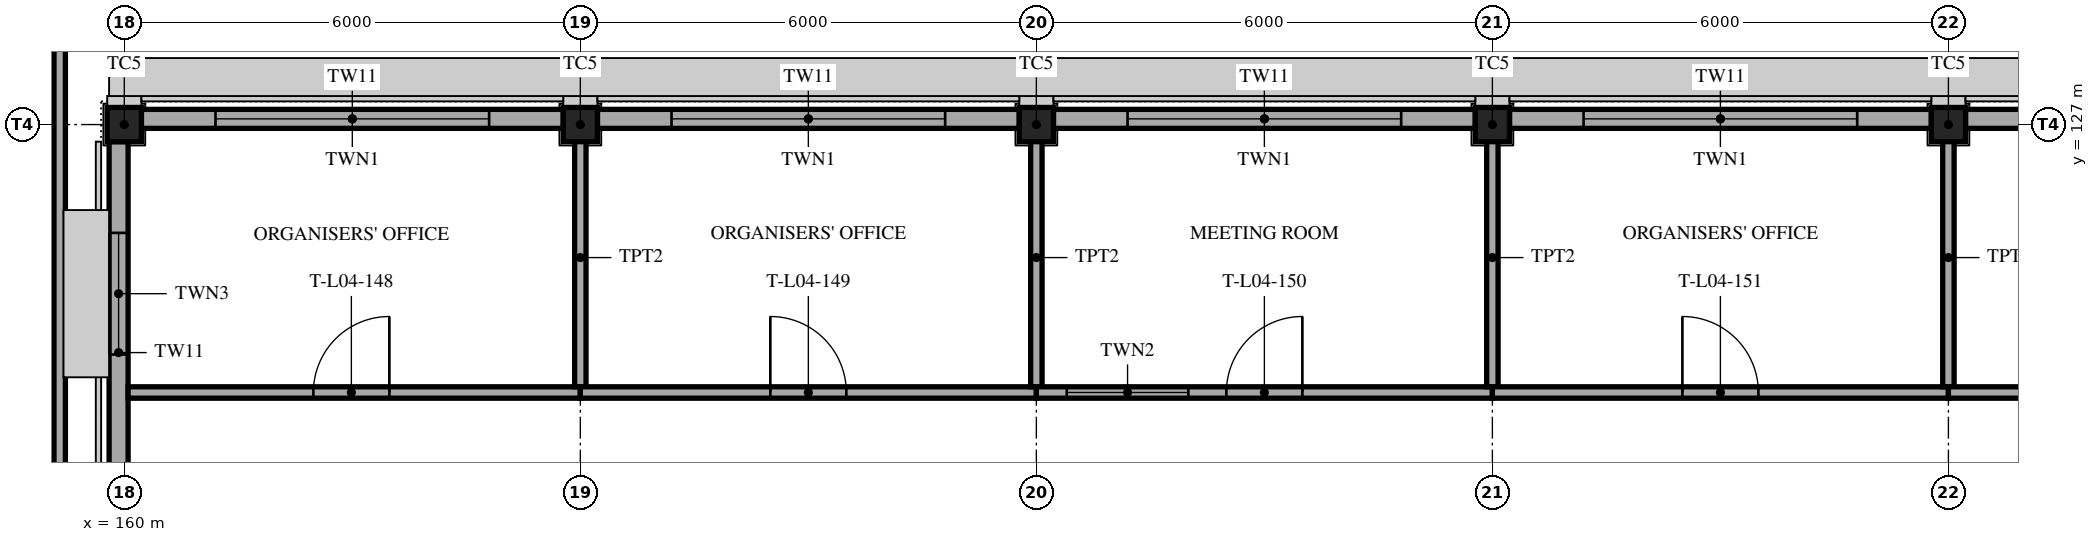
"""IFC4 building model, lengths in metres.
Left out: names, types, materials, properties, quantities, classifications, styles, units other than length and angle.
Written with IfcOpenShell. Run it as: python <this file> out.ifc"""

import sys

from ifc_helpers import new_model, si_unit, direction, frame, frame_2d, origin, origin_2d, place, context, subcontext, project, spatial, polyline, rectangle, hollow_rectangle, outline, extrude, element, fill, save


model = new_model("IFC4")
c1 = context("Model", 3, precision=1e-05, world=origin(), true_north=direction((0.0, 1.0)))
c2 = subcontext(c1, "Body", "Model", "MODEL_VIEW")
j1 = project(units=[si_unit("LENGTHUNIT", "METRE"), si_unit("PLANEANGLEUNIT", "RADIAN")], contexts=[c1])
p1 = place(None, origin())
s1 = spatial("IfcSite", under=j1, at=p1, CompositionType="ELEMENT")
p2 = place(p1, origin())
s2 = spatial("IfcBuilding", under=s1, at=p2, CompositionType="ELEMENT")
p3 = place(p2, frame((0.0, 0.0, 19.2)))
s3 = spatial("IfcBuildingStorey", under=s2, at=p3, CompositionType="ELEMENT", Elevation=19.2)
for number, where, z_axis, x_axis in (
    (1, (160.0, 127.0, 0.0), (0.0, 0.0, 1.0), (1.0, 0.0, 0.0)),
    (2, (166.0, 127.0, 0.0), (0.0, 0.0, 1.0), (1.0, 0.0, 0.0)),
    (3, (172.0, 127.0, 0.0), (0.0, 0.0, 1.0), (1.0, 0.0, 0.0)),
    (4, (178.0, 127.0, 0.0), (0.0, 0.0, 1.0), (1.0, 0.0, 0.0)),
    (5, (184.0, 127.0, 0.0), (0.0, 0.0, 1.0), (1.0, 0.0, 0.0)),
):
    element("IfcColumn", number, at=place(p3, frame(where, z_axis=z_axis, x_axis=x_axis)), inside=s3, PredefinedType="COLUMN", context=c2, shape_type="SweptSolid", body=[
        extrude(hollow_rectangle(XDim=0.45, YDim=0.45, WallThickness=0.025, at=origin_2d()), origin(), (0.0, 0.0, 1.0), 4.2),
    ])
p4 = place(p3, frame((159.15, 109.6, 0.0), z_axis=(0.0, 0.0, 1.0), x_axis=(0.0, 1.0, 0.0)))
e6 = element("IfcWall", 6, at=p4, inside=s3, PredefinedType="STANDARD", context=c2, shape_type="SweptSolid", body=[
    extrude(outline(polyline([(0.0, 0.0), (23.0, 0.0), (22.97, 2.453), (22.83, 2.453), (22.829, 2.753), (19.171, 3.957), (19.17, 3.701), (19.03, 3.701), (19.029, 4.001), (15.371, 5.109), (15.37, 4.849), (15.23, 4.849), (15.229, 5.15), (11.571, 6.16), (11.57, 5.88), (11.43, 5.88), (11.429, 6.16), (7.771, 5.15), (7.77, 4.849), (7.63, 4.849), (7.629, 5.109), (3.971, 4.001), (3.97, 3.701), (3.83, 3.701), (3.829, 3.957), (0.171, 2.753), (0.17, 2.453), (0.03, 2.453), (0.0, 0.0)])), frame((0.0, 0.075, 0.0), z_axis=(0.0, -1.0, 0.0), x_axis=(1.0, 0.0, 0.0)), (0.0, 0.0, 1.0), 0.15),
])
p5 = place(p3, frame((160.225, 127.075, 0.0), z_axis=(0.0, 0.0, 1.0), x_axis=(1.0, 0.0, 0.0)))
e7 = element("IfcWall", 7, at=p5, inside=s3, PredefinedType="SOLIDWALL", context=c2, shape_type="SweptSolid", body=[
    extrude(rectangle(XDim=5.55, YDim=0.25, at=frame_2d((2.775, 0.0))), origin(), (0.0, 0.0, 1.0), 3.55),
])
p6 = place(p5, frame((0.975, 0.0, 0.9)))
e8 = element("IfcOpeningElement", 8, at=p6, cuts=e7, PredefinedType="OPENING", context=c2, shape_type="SweptSolid", body=[
    extrude(rectangle(XDim=3.6, YDim=2.4, at=frame_2d((1.8, 1.2))), frame((0.0, 0.135, 0.0), z_axis=(0.0, -1.0, 0.0), x_axis=(1.0, 0.0, 0.0)), (0.0, 0.0, 1.0), 0.27),
])
p7 = place(p3, frame((166.225, 127.075, 0.0), z_axis=(0.0, 0.0, 1.0), x_axis=(1.0, 0.0, 0.0)))
e9 = element("IfcWall", 9, at=p7, inside=s3, PredefinedType="SOLIDWALL", context=c2, shape_type="SweptSolid", body=[
    extrude(rectangle(XDim=5.55, YDim=0.25, at=frame_2d((2.775, 0.0))), origin(), (0.0, 0.0, 1.0), 3.55),
])
p8 = place(p7, frame((0.975, 0.0, 0.9)))
e10 = element("IfcOpeningElement", 10, at=p8, cuts=e9, PredefinedType="OPENING", context=c2, shape_type="SweptSolid", body=[
    extrude(rectangle(XDim=3.6, YDim=2.4, at=frame_2d((1.8, 1.2))), frame((0.0, 0.135, 0.0), z_axis=(0.0, -1.0, 0.0), x_axis=(1.0, 0.0, 0.0)), (0.0, 0.0, 1.0), 0.27),
])
p9 = place(p3, frame((172.225, 127.075, 0.0), z_axis=(0.0, 0.0, 1.0), x_axis=(1.0, 0.0, 0.0)))
e11 = element("IfcWall", 11, at=p9, inside=s3, PredefinedType="SOLIDWALL", context=c2, shape_type="SweptSolid", body=[
    extrude(rectangle(XDim=5.55, YDim=0.25, at=frame_2d((2.775, 0.0))), origin(), (0.0, 0.0, 1.0), 3.55),
])
p10 = place(p9, frame((0.975, 0.0, 0.9)))
e12 = element("IfcOpeningElement", 12, at=p10, cuts=e11, PredefinedType="OPENING", context=c2, shape_type="SweptSolid", body=[
    extrude(rectangle(XDim=3.6, YDim=2.4, at=frame_2d((1.8, 1.2))), frame((0.0, 0.135, 0.0), z_axis=(0.0, -1.0, 0.0), x_axis=(1.0, 0.0, 0.0)), (0.0, 0.0, 1.0), 0.27),
])
p11 = place(p3, frame((178.225, 127.075, 0.0), z_axis=(0.0, 0.0, 1.0), x_axis=(1.0, 0.0, 0.0)))
e13 = element("IfcWall", 13, at=p11, inside=s3, PredefinedType="SOLIDWALL", context=c2, shape_type="SweptSolid", body=[
    extrude(rectangle(XDim=5.55, YDim=0.25, at=frame_2d((2.775, 0.0))), origin(), (0.0, 0.0, 1.0), 3.55),
])
p12 = place(p11, frame((0.975, 0.0, 0.9)))
e14 = element("IfcOpeningElement", 14, at=p12, cuts=e13, PredefinedType="OPENING", context=c2, shape_type="SweptSolid", body=[
    extrude(rectangle(XDim=3.6, YDim=2.4, at=frame_2d((1.8, 1.2))), frame((0.0, 0.135, 0.0), z_axis=(0.0, -1.0, 0.0), x_axis=(1.0, 0.0, 0.0)), (0.0, 0.0, 1.0), 0.27),
])
p13 = place(p3, frame((184.225, 127.075, 0.0), z_axis=(0.0, 0.0, 1.0), x_axis=(1.0, 0.0, 0.0)))
e15 = element("IfcWall", 15, at=p13, inside=s3, PredefinedType="SOLIDWALL", context=c2, shape_type="SweptSolid", body=[
    extrude(rectangle(XDim=5.55, YDim=0.25, at=frame_2d((2.775, 0.0))), origin(), (0.0, 0.0, 1.0), 3.55),
])
p14 = place(p13, frame((0.975, 0.0, 0.9)))
e16 = element("IfcOpeningElement", 16, at=p14, cuts=e15, PredefinedType="OPENING", context=c2, shape_type="SweptSolid", body=[
    extrude(rectangle(XDim=3.6, YDim=2.4, at=frame_2d((1.8, 1.2))), frame((0.0, 0.135, 0.0), z_axis=(0.0, -1.0, 0.0), x_axis=(1.0, 0.0, 0.0)), (0.0, 0.0, 1.0), 0.27),
])
p15 = place(p3, frame((159.925, 121.225, 0.0), z_axis=(0.0, 0.0, 1.0), x_axis=(0.0, 1.0, 0.0)))
e17 = element("IfcWall", 17, at=p15, inside=s3, PredefinedType="SOLIDWALL", context=c2, shape_type="SweptSolid", body=[
    extrude(rectangle(XDim=5.55, YDim=0.25, at=frame_2d((2.775, 0.0))), origin(), (0.0, 0.0, 1.0), 3.55),
])
p16 = place(p15, frame((2.75, 0.0, 1.75)))
e18 = element("IfcOpeningElement", 18, at=p16, cuts=e17, PredefinedType="OPENING", context=c2, shape_type="SweptSolid", body=[
    extrude(rectangle(XDim=1.6, YDim=1.6, at=frame_2d((0.8, 0.8))), frame((0.0, 0.135, 0.0), z_axis=(0.0, -1.0, 0.0), x_axis=(1.0, 0.0, 0.0)), (0.0, 0.0, 1.0), 0.27),
])
p17 = place(p3, frame((160.05, 123.475, 0.0), z_axis=(0.0, 0.0, 1.0), x_axis=(1.0, 0.0, 0.0)))
e19 = element("IfcWall", 19, at=p17, inside=s3, PredefinedType="PARTITIONING", context=c2, shape_type="SweptSolid", body=[
    extrude(rectangle(XDim=5.95, YDim=0.15, at=frame_2d((2.975, 0.0))), origin(), (0.0, 0.0, 1.0), 3.45),
])
p18 = place(p17, frame((2.438, 0.0, 0.0)))
e20 = element("IfcOpeningElement", 20, at=p18, cuts=e19, PredefinedType="OPENING", context=c2, shape_type="SweptSolid", body=[
    extrude(rectangle(XDim=1.0, YDim=2.1, at=frame_2d((0.5, 1.05))), frame((0.0, 0.085, 0.0), z_axis=(0.0, -1.0, 0.0), x_axis=(1.0, 0.0, 0.0)), (0.0, 0.0, 1.0), 0.17),
])
p19 = place(p3, frame((166.0, 123.55, 0.0), z_axis=(0.0, 0.0, 1.0), x_axis=(0.0, 1.0, 0.0)))
e21 = element("IfcWall", 21, at=p19, inside=s3, PredefinedType="PARTITIONING", context=c2, shape_type="SweptSolid", body=[
    extrude(rectangle(XDim=3.4, YDim=0.15, at=frame_2d((1.7, 0.0))), origin(), (0.0, 0.0, 1.0), 3.45),
])
p20 = place(p3, frame((166.0, 123.475, 0.0), z_axis=(0.0, 0.0, 1.0), x_axis=(1.0, 0.0, 0.0)))
e22 = element("IfcWall", 22, at=p20, inside=s3, PredefinedType="PARTITIONING", context=c2, shape_type="SweptSolid", body=[
    extrude(rectangle(XDim=6.0, YDim=0.15, at=frame_2d((3.0, 0.0))), origin(), (0.0, 0.0, 1.0), 3.45),
])
p21 = place(p20, frame((2.5, 0.0, 0.0)))
e23 = element("IfcOpeningElement", 23, at=p21, cuts=e22, PredefinedType="OPENING", context=c2, shape_type="SweptSolid", body=[
    extrude(rectangle(XDim=1.0, YDim=2.1, at=frame_2d((0.5, 1.05))), frame((0.0, 0.085, 0.0), z_axis=(0.0, -1.0, 0.0), x_axis=(1.0, 0.0, 0.0)), (0.0, 0.0, 1.0), 0.17),
])
p22 = place(p3, frame((172.0, 123.55, 0.0), z_axis=(0.0, 0.0, 1.0), x_axis=(0.0, 1.0, 0.0)))
e24 = element("IfcWall", 24, at=p22, inside=s3, PredefinedType="PARTITIONING", context=c2, shape_type="SweptSolid", body=[
    extrude(rectangle(XDim=3.4, YDim=0.15, at=frame_2d((1.7, 0.0))), origin(), (0.0, 0.0, 1.0), 3.45),
])
p23 = place(p3, frame((172.0, 123.475, 0.0), z_axis=(0.0, 0.0, 1.0), x_axis=(1.0, 0.0, 0.0)))
e25 = element("IfcWall", 25, at=p23, inside=s3, PredefinedType="PARTITIONING", context=c2, shape_type="SweptSolid", body=[
    extrude(rectangle(XDim=6.0, YDim=0.15, at=frame_2d((3.0, 0.0))), origin(), (0.0, 0.0, 1.0), 3.45),
])
p24 = place(p23, frame((0.4, 0.0, 0.9)))
e26 = element("IfcOpeningElement", 26, at=p24, cuts=e25, PredefinedType="OPENING", context=c2, shape_type="SweptSolid", body=[
    extrude(rectangle(XDim=1.6, YDim=1.2, at=frame_2d((0.8, 0.6))), frame((0.0, 0.085, 0.0), z_axis=(0.0, -1.0, 0.0), x_axis=(1.0, 0.0, 0.0)), (0.0, 0.0, 1.0), 0.17),
])
p25 = place(p23, frame((2.5, 0.0, 0.0)))
e27 = element("IfcOpeningElement", 27, at=p25, cuts=e25, PredefinedType="OPENING", context=c2, shape_type="SweptSolid", body=[
    extrude(rectangle(XDim=1.0, YDim=2.1, at=frame_2d((0.5, 1.05))), frame((0.0, 0.085, 0.0), z_axis=(0.0, -1.0, 0.0), x_axis=(1.0, 0.0, 0.0)), (0.0, 0.0, 1.0), 0.17),
])
p26 = place(p3, frame((178.0, 123.55, 0.0), z_axis=(0.0, 0.0, 1.0), x_axis=(0.0, 1.0, 0.0)))
e28 = element("IfcWall", 28, at=p26, inside=s3, PredefinedType="PARTITIONING", context=c2, shape_type="SweptSolid", body=[
    extrude(rectangle(XDim=3.4, YDim=0.15, at=frame_2d((1.7, 0.0))), origin(), (0.0, 0.0, 1.0), 3.45),
])
p27 = place(p3, frame((178.0, 123.475, 0.0), z_axis=(0.0, 0.0, 1.0), x_axis=(1.0, 0.0, 0.0)))
e29 = element("IfcWall", 29, at=p27, inside=s3, PredefinedType="PARTITIONING", context=c2, shape_type="SweptSolid", body=[
    extrude(rectangle(XDim=6.0, YDim=0.15, at=frame_2d((3.0, 0.0))), origin(), (0.0, 0.0, 1.0), 3.45),
])
p28 = place(p27, frame((2.5, 0.0, 0.0)))
e30 = element("IfcOpeningElement", 30, at=p28, cuts=e29, PredefinedType="OPENING", context=c2, shape_type="SweptSolid", body=[
    extrude(rectangle(XDim=1.0, YDim=2.1, at=frame_2d((0.5, 1.05))), frame((0.0, 0.085, 0.0), z_axis=(0.0, -1.0, 0.0), x_axis=(1.0, 0.0, 0.0)), (0.0, 0.0, 1.0), 0.17),
])
p29 = place(p3, frame((184.0, 123.55, 0.0), z_axis=(0.0, 0.0, 1.0), x_axis=(0.0, 1.0, 0.0)))
e31 = element("IfcWall", 31, at=p29, inside=s3, PredefinedType="PARTITIONING", context=c2, shape_type="SweptSolid", body=[
    extrude(rectangle(XDim=3.4, YDim=0.15, at=frame_2d((1.7, 0.0))), origin(), (0.0, 0.0, 1.0), 3.45),
])
p30 = place(p3, frame((184.0, 123.475, 0.0), z_axis=(0.0, 0.0, 1.0), x_axis=(1.0, 0.0, 0.0)))
e32 = element("IfcWall", 32, at=p30, inside=s3, PredefinedType="PARTITIONING", context=c2, shape_type="SweptSolid", body=[
    extrude(rectangle(XDim=6.0, YDim=0.15, at=frame_2d((3.0, 0.0))), origin(), (0.0, 0.0, 1.0), 3.45),
])
p31 = place(p30, frame((2.5, 0.0, 0.0)))
e33 = element("IfcOpeningElement", 33, at=p31, cuts=e32, PredefinedType="OPENING", context=c2, shape_type="SweptSolid", body=[
    extrude(rectangle(XDim=1.0, YDim=2.1, at=frame_2d((0.5, 1.05))), frame((0.0, 0.085, 0.0), z_axis=(0.0, -1.0, 0.0), x_axis=(1.0, 0.0, 0.0)), (0.0, 0.0, 1.0), 0.17),
])
p32 = place(p6, origin())
e34 = element("IfcWindow", 34, at=p32, inside=s3, PartitioningType="TRIPLE_PANEL_VERTICAL", PredefinedType="WINDOW", context=c2, shape_type="SweptSolid", body=[
    extrude(outline(polyline([(0.0, 0.0), (3.6, 0.0), (3.6, 2.4), (0.0, 2.4), (0.0, 0.0)]), holes=[polyline([(0.06, 0.06), (0.96, 0.06), (0.96, 2.34), (0.06, 2.34), (0.06, 0.06)]), polyline([(1.06, 0.06), (2.54, 0.06), (2.54, 2.34), (1.06, 2.34), (1.06, 0.06)]), polyline([(2.64, 0.06), (3.54, 0.06), (3.54, 2.34), (2.64, 2.34), (2.64, 0.06)])]), frame((0.0, 0.03, 0.0), z_axis=(0.0, -1.0, 0.0), x_axis=(1.0, 0.0, 0.0)), (0.0, 0.0, 1.0), 0.06),
    extrude(rectangle(XDim=0.924, YDim=2.304, at=frame_2d((0.51, 1.2))), frame((0.0, 0.01, 0.0), z_axis=(0.0, -1.0, 0.0), x_axis=(1.0, 0.0, 0.0)), (0.0, 0.0, 1.0), 0.02),
    extrude(rectangle(XDim=1.504, YDim=2.304, at=frame_2d((1.8, 1.2))), frame((0.0, 0.01, 0.0), z_axis=(0.0, -1.0, 0.0), x_axis=(1.0, 0.0, 0.0)), (0.0, 0.0, 1.0), 0.02),
    extrude(rectangle(XDim=0.924, YDim=2.304, at=frame_2d((3.09, 1.2))), frame((0.0, 0.01, 0.0), z_axis=(0.0, -1.0, 0.0), x_axis=(1.0, 0.0, 0.0)), (0.0, 0.0, 1.0), 0.02),
])
fill(e8, e34)
p33 = place(p8, origin())
e35 = element("IfcWindow", 35, at=p33, inside=s3, PartitioningType="TRIPLE_PANEL_VERTICAL", PredefinedType="WINDOW", context=c2, shape_type="SweptSolid", body=[
    extrude(outline(polyline([(0.0, 0.0), (3.6, 0.0), (3.6, 2.4), (0.0, 2.4), (0.0, 0.0)]), holes=[polyline([(0.06, 0.06), (0.96, 0.06), (0.96, 2.34), (0.06, 2.34), (0.06, 0.06)]), polyline([(1.06, 0.06), (2.54, 0.06), (2.54, 2.34), (1.06, 2.34), (1.06, 0.06)]), polyline([(2.64, 0.06), (3.54, 0.06), (3.54, 2.34), (2.64, 2.34), (2.64, 0.06)])]), frame((0.0, 0.03, 0.0), z_axis=(0.0, -1.0, 0.0), x_axis=(1.0, 0.0, 0.0)), (0.0, 0.0, 1.0), 0.06),
    extrude(rectangle(XDim=0.924, YDim=2.304, at=frame_2d((0.51, 1.2))), frame((0.0, 0.01, 0.0), z_axis=(0.0, -1.0, 0.0), x_axis=(1.0, 0.0, 0.0)), (0.0, 0.0, 1.0), 0.02),
    extrude(rectangle(XDim=1.504, YDim=2.304, at=frame_2d((1.8, 1.2))), frame((0.0, 0.01, 0.0), z_axis=(0.0, -1.0, 0.0), x_axis=(1.0, 0.0, 0.0)), (0.0, 0.0, 1.0), 0.02),
    extrude(rectangle(XDim=0.924, YDim=2.304, at=frame_2d((3.09, 1.2))), frame((0.0, 0.01, 0.0), z_axis=(0.0, -1.0, 0.0), x_axis=(1.0, 0.0, 0.0)), (0.0, 0.0, 1.0), 0.02),
])
fill(e10, e35)
p34 = place(p10, origin())
e36 = element("IfcWindow", 36, at=p34, inside=s3, PartitioningType="TRIPLE_PANEL_VERTICAL", PredefinedType="WINDOW", context=c2, shape_type="SweptSolid", body=[
    extrude(outline(polyline([(0.0, 0.0), (3.6, 0.0), (3.6, 2.4), (0.0, 2.4), (0.0, 0.0)]), holes=[polyline([(0.06, 0.06), (0.96, 0.06), (0.96, 2.34), (0.06, 2.34), (0.06, 0.06)]), polyline([(1.06, 0.06), (2.54, 0.06), (2.54, 2.34), (1.06, 2.34), (1.06, 0.06)]), polyline([(2.64, 0.06), (3.54, 0.06), (3.54, 2.34), (2.64, 2.34), (2.64, 0.06)])]), frame((0.0, 0.03, 0.0), z_axis=(0.0, -1.0, 0.0), x_axis=(1.0, 0.0, 0.0)), (0.0, 0.0, 1.0), 0.06),
    extrude(rectangle(XDim=0.924, YDim=2.304, at=frame_2d((0.51, 1.2))), frame((0.0, 0.01, 0.0), z_axis=(0.0, -1.0, 0.0), x_axis=(1.0, 0.0, 0.0)), (0.0, 0.0, 1.0), 0.02),
    extrude(rectangle(XDim=1.504, YDim=2.304, at=frame_2d((1.8, 1.2))), frame((0.0, 0.01, 0.0), z_axis=(0.0, -1.0, 0.0), x_axis=(1.0, 0.0, 0.0)), (0.0, 0.0, 1.0), 0.02),
    extrude(rectangle(XDim=0.924, YDim=2.304, at=frame_2d((3.09, 1.2))), frame((0.0, 0.01, 0.0), z_axis=(0.0, -1.0, 0.0), x_axis=(1.0, 0.0, 0.0)), (0.0, 0.0, 1.0), 0.02),
])
fill(e12, e36)
p35 = place(p12, origin())
e37 = element("IfcWindow", 37, at=p35, inside=s3, PartitioningType="TRIPLE_PANEL_VERTICAL", PredefinedType="WINDOW", context=c2, shape_type="SweptSolid", body=[
    extrude(outline(polyline([(0.0, 0.0), (3.6, 0.0), (3.6, 2.4), (0.0, 2.4), (0.0, 0.0)]), holes=[polyline([(0.06, 0.06), (0.96, 0.06), (0.96, 2.34), (0.06, 2.34), (0.06, 0.06)]), polyline([(1.06, 0.06), (2.54, 0.06), (2.54, 2.34), (1.06, 2.34), (1.06, 0.06)]), polyline([(2.64, 0.06), (3.54, 0.06), (3.54, 2.34), (2.64, 2.34), (2.64, 0.06)])]), frame((0.0, 0.03, 0.0), z_axis=(0.0, -1.0, 0.0), x_axis=(1.0, 0.0, 0.0)), (0.0, 0.0, 1.0), 0.06),
    extrude(rectangle(XDim=0.924, YDim=2.304, at=frame_2d((0.51, 1.2))), frame((0.0, 0.01, 0.0), z_axis=(0.0, -1.0, 0.0), x_axis=(1.0, 0.0, 0.0)), (0.0, 0.0, 1.0), 0.02),
    extrude(rectangle(XDim=1.504, YDim=2.304, at=frame_2d((1.8, 1.2))), frame((0.0, 0.01, 0.0), z_axis=(0.0, -1.0, 0.0), x_axis=(1.0, 0.0, 0.0)), (0.0, 0.0, 1.0), 0.02),
    extrude(rectangle(XDim=0.924, YDim=2.304, at=frame_2d((3.09, 1.2))), frame((0.0, 0.01, 0.0), z_axis=(0.0, -1.0, 0.0), x_axis=(1.0, 0.0, 0.0)), (0.0, 0.0, 1.0), 0.02),
])
fill(e14, e37)
p36 = place(p16, origin())
e38 = element("IfcWindow", 38, at=p36, inside=s3, PartitioningType="TRIPLE_PANEL_VERTICAL", PredefinedType="WINDOW", context=c2, shape_type="SweptSolid", body=[
    extrude(outline(polyline([(0.0, 0.0), (1.6, 0.0), (1.6, 1.6), (0.0, 1.6), (0.0, 0.0)]), holes=[polyline([(0.06, 0.06), (0.56, 0.06), (0.56, 1.54), (0.06, 1.54), (0.06, 0.06)]), polyline([(0.66, 0.06), (0.94, 0.06), (0.94, 1.54), (0.66, 1.54), (0.66, 0.06)]), polyline([(1.04, 0.06), (1.54, 0.06), (1.54, 1.54), (1.04, 1.54), (1.04, 0.06)])]), frame((0.0, 0.03, 0.0), z_axis=(0.0, -1.0, 0.0), x_axis=(1.0, 0.0, 0.0)), (0.0, 0.0, 1.0), 0.06),
    extrude(rectangle(XDim=0.524, YDim=1.504, at=frame_2d((0.31, 0.8))), frame((0.0, 0.01, 0.0), z_axis=(0.0, -1.0, 0.0), x_axis=(1.0, 0.0, 0.0)), (0.0, 0.0, 1.0), 0.02),
    extrude(rectangle(XDim=0.304, YDim=1.504, at=frame_2d((0.8, 0.8))), frame((0.0, 0.01, 0.0), z_axis=(0.0, -1.0, 0.0), x_axis=(1.0, 0.0, 0.0)), (0.0, 0.0, 1.0), 0.02),
    extrude(rectangle(XDim=0.524, YDim=1.504, at=frame_2d((1.29, 0.8))), frame((0.0, 0.01, 0.0), z_axis=(0.0, -1.0, 0.0), x_axis=(1.0, 0.0, 0.0)), (0.0, 0.0, 1.0), 0.02),
])
fill(e18, e38)
p37 = place(p24, origin())
e39 = element("IfcWindow", 39, at=p37, inside=s3, PartitioningType="SINGLE_PANEL", PredefinedType="WINDOW", context=c2, shape_type="SweptSolid", body=[
    extrude(rectangle(XDim=1.6, YDim=1.2, at=frame_2d((0.8, 0.6))), frame((0.0, 0.03, 0.0), z_axis=(0.0, -1.0, 0.0), x_axis=(1.0, 0.0, 0.0)), (0.0, 0.0, 1.0), 0.06),
])
fill(e26, e39)
p38 = place(p18, origin())
e40 = element("IfcDoor", 40, at=p38, inside=s3, OperationType="SINGLE_SWING_RIGHT", PredefinedType="DOOR", context=c2, shape_type="SweptSolid", body=[
    extrude(rectangle(XDim=1.0, YDim=2.1, at=frame_2d((0.5, 1.05))), frame((0.0, 0.025, 0.0), z_axis=(0.0, -1.0, 0.0), x_axis=(1.0, 0.0, 0.0)), (0.0, 0.0, 1.0), 0.05),
])
fill(e20, e40)
p39 = place(p21, origin())
e41 = element("IfcDoor", 41, at=p39, inside=s3, OperationType="SINGLE_SWING_LEFT", PredefinedType="DOOR", context=c2, shape_type="SweptSolid", body=[
    extrude(rectangle(XDim=1.0, YDim=2.1, at=frame_2d((0.5, 1.05))), frame((0.0, 0.025, 0.0), z_axis=(0.0, -1.0, 0.0), x_axis=(1.0, 0.0, 0.0)), (0.0, 0.0, 1.0), 0.05),
])
fill(e23, e41)
p40 = place(p25, origin())
e42 = element("IfcDoor", 42, at=p40, inside=s3, OperationType="SINGLE_SWING_RIGHT", PredefinedType="DOOR", context=c2, shape_type="SweptSolid", body=[
    extrude(rectangle(XDim=1.0, YDim=2.1, at=frame_2d((0.5, 1.05))), frame((0.0, 0.025, 0.0), z_axis=(0.0, -1.0, 0.0), x_axis=(1.0, 0.0, 0.0)), (0.0, 0.0, 1.0), 0.05),
])
fill(e27, e42)
p41 = place(p28, origin())
e43 = element("IfcDoor", 43, at=p41, inside=s3, OperationType="SINGLE_SWING_LEFT", PredefinedType="DOOR", context=c2, shape_type="SweptSolid", body=[
    extrude(rectangle(XDim=1.0, YDim=2.1, at=frame_2d((0.5, 1.05))), frame((0.0, 0.025, 0.0), z_axis=(0.0, -1.0, 0.0), x_axis=(1.0, 0.0, 0.0)), (0.0, 0.0, 1.0), 0.05),
])
fill(e30, e43)
save(model, sys.argv[1])
